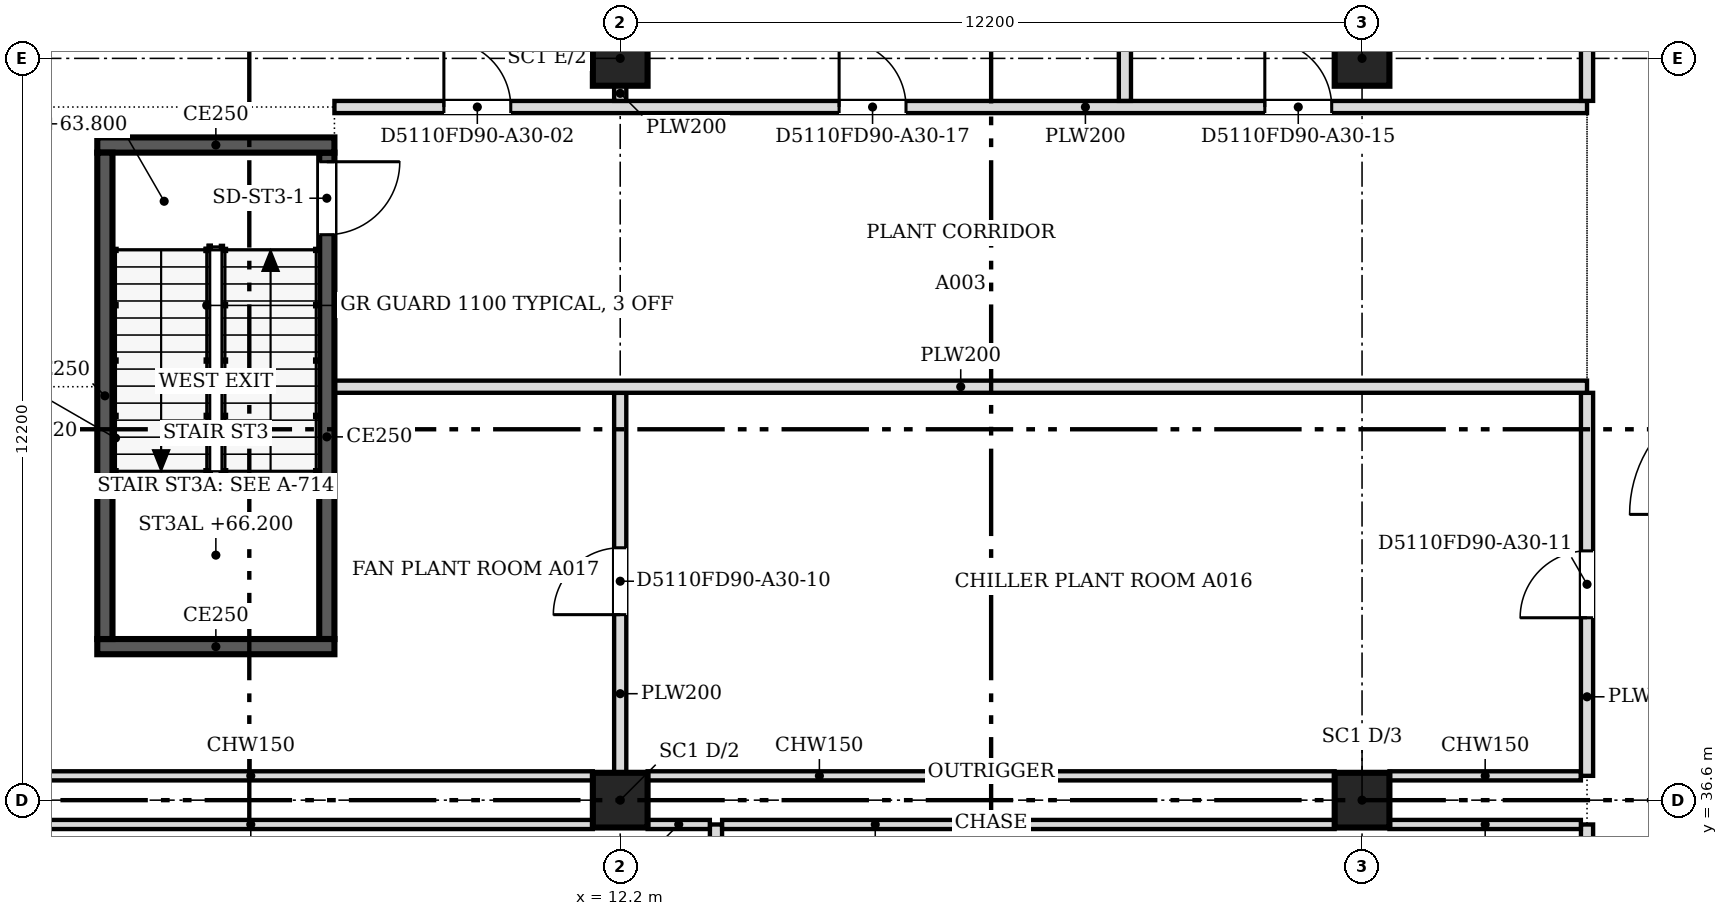
"""IFC4 building model, lengths in metres.
Left out: names, types, materials, properties, quantities, classifications, styles, units other than length and angle.
Written with IfcOpenShell. Run it as: python <this file> out.ifc"""

import sys

from ifc_helpers import new_model, si_unit, direction, frame, frame_2d, origin, origin_2d, place, context, subcontext, project, spatial, rectangle, extrude, source, transform, mapped, element, fill, save


model = new_model("IFC4")
c1 = context("Model", 3, precision=1e-05, world=origin(), true_north=direction((0.0, 1.0)))
c2 = subcontext(c1, "Body", "Model", "MODEL_VIEW")
j1 = project(units=[si_unit("LENGTHUNIT", "METRE"), si_unit("PLANEANGLEUNIT", "RADIAN")], contexts=[c1])
p1 = place(None, origin())
s1 = spatial("IfcSite", under=j1, at=p1, CompositionType="ELEMENT")
p2 = place(p1, origin())
s2 = spatial("IfcBuilding", under=s1, at=p2, CompositionType="ELEMENT")
p3 = place(p2, frame((0.0, 0.0, 63.8)))
s3 = spatial("IfcBuildingStorey", under=s2, at=p3, CompositionType="ELEMENT", Elevation=63.8)
for number, where, z_axis, x_axis in (
    (1, (12.2, 36.6, 0.0), (0.0, 0.0, 1.0), (1.0, 0.0, 0.0)),
    (2, (12.2, 48.8, 0.0), (0.0, 0.0, 1.0), (1.0, 0.0, 0.0)),
    (3, (24.4, 36.6, 0.0), (0.0, 0.0, 1.0), (1.0, 0.0, 0.0)),
    (4, (24.4, 48.8, 0.0), (0.0, 0.0, 1.0), (1.0, 0.0, 0.0)),
):
    element("IfcColumn", number, at=place(p3, frame(where, z_axis=z_axis, x_axis=x_axis)), inside=s3, PredefinedType="COLUMN", context=c2, shape_type="SweptSolid", body=[
        extrude(rectangle(XDim=0.9, YDim=0.9, at=origin_2d()), origin(), (0.0, 0.0, 1.0), 4.6),
    ])
p4 = place(p3, frame((7.5, 39.125, 0.0), z_axis=(0.0, 0.0, 1.0), x_axis=(-1.0, 0.0, 0.0)))
e5 = element("IfcWall", 5, at=p4, inside=s3, PredefinedType="SOLIDWALL", context=c2, shape_type="SweptSolid", body=[
    extrude(rectangle(XDim=3.9, YDim=0.25, at=frame_2d((1.95, 0.0))), origin(), (0.0, 0.0, 1.0), 4.8),
])
p5 = place(p3, frame((3.725, 39.25, 0.0), z_axis=(0.0, 0.0, 1.0), x_axis=(0.0, 1.0, 0.0)))
e6 = element("IfcWall", 6, at=p5, inside=s3, PredefinedType="SOLIDWALL", context=c2, shape_type="SweptSolid", body=[
    extrude(rectangle(XDim=8.0, YDim=0.25, at=frame_2d((4.0, 0.0))), origin(), (0.0, 0.0, 1.0), 4.8),
])
p6 = place(p3, frame((3.6, 47.375, 0.0), z_axis=(0.0, 0.0, 1.0), x_axis=(1.0, 0.0, 0.0)))
e7 = element("IfcWall", 7, at=p6, inside=s3, PredefinedType="SOLIDWALL", context=c2, shape_type="SweptSolid", body=[
    extrude(rectangle(XDim=3.9, YDim=0.25, at=frame_2d((1.95, 0.0))), origin(), (0.0, 0.0, 1.0), 4.8),
])
p7 = place(p3, frame((7.375, 47.25, 0.0), z_axis=(0.0, 0.0, 1.0), x_axis=(0.0, -1.0, 0.0)))
e8 = element("IfcWall", 8, at=p7, inside=s3, PredefinedType="SOLIDWALL", context=c2, shape_type="SweptSolid", body=[
    extrude(rectangle(XDim=8.0, YDim=0.25, at=frame_2d((4.0, 0.0))), origin(), (0.0, 0.0, 1.0), 4.8),
])
m1 = source(origin(), c2, "Body", "SweptSolid", [
    extrude(rectangle(XDim=1.2, YDim=2.1, at=frame_2d((0.6, 1.05))), frame((0.0, 0.135, 0.0), z_axis=(0.0, -1.0, 0.0), x_axis=(1.0, 0.0, 0.0)), (0.0, 0.0, 1.0), 0.27),
])
p8 = place(p7, frame((0.15, 0.0, 0.0)))
e9 = element("IfcOpeningElement", 9, at=p8, cuts=e8, PredefinedType="OPENING", context=c2, shape_type="MappedRepresentation", body=[
    mapped(m1, transform((0.0, 0.0, 0.0), scale=1.0)),
])
p9 = place(p3, frame((13.775, 30.201, 0.0), z_axis=(0.0, 0.0, 1.0), x_axis=(0.0, 1.0, 0.0)))
e10 = element("IfcWall", 10, at=p9, inside=s3, PredefinedType="PARTITIONING", context=c2, shape_type="SweptSolid", body=[
    extrude(rectangle(XDim=5.999, YDim=0.2, at=frame_2d((3.0, 0.0))), origin(), (0.0, 0.0, 1.0), 4.067),
])
m2 = source(origin(), c2, "Body", "SweptSolid", [
    extrude(rectangle(XDim=1.1, YDim=2.1, at=frame_2d((0.55, 1.05))), frame((0.0, 0.11, 0.0), z_axis=(0.0, -1.0, 0.0), x_axis=(1.0, 0.0, 0.0)), (0.0, 0.0, 1.0), 0.22),
])
p10 = place(p9, frame((2.4, 0.0, 0.0)))
e11 = element("IfcOpeningElement", 11, at=p10, cuts=e10, PredefinedType="OPENING", context=c2, shape_type="MappedRepresentation", body=[
    mapped(m2, transform((0.0, 0.0, 0.0), scale=1.0)),
])
p11 = place(p3, frame((28.1, 30.201, 0.0), z_axis=(0.0, 0.0, 1.0), x_axis=(0.0, 1.0, 0.0)))
e12 = element("IfcWall", 12, at=p11, inside=s3, PredefinedType="PARTITIONING", context=c2, shape_type="SweptSolid", body=[
    extrude(rectangle(XDim=5.999, YDim=0.2, at=frame_2d((3.0, 0.0))), origin(), (0.0, 0.0, 1.0), 4.067),
])
p12 = place(p11, frame((2.4, 0.0, 0.0)))
e13 = element("IfcOpeningElement", 13, at=p12, cuts=e12, PredefinedType="OPENING", context=c2, shape_type="MappedRepresentation", body=[
    mapped(m2, transform((0.0, 0.0, 0.0), scale=1.0)),
])
p13 = place(p3, frame((0.5, 36.2, 0.0), z_axis=(0.0, 0.0, 1.0), x_axis=(1.0, 0.0, 0.0)))
e14 = element("IfcWall", 14, at=p13, inside=s3, PredefinedType="PARTITIONING", context=c2, shape_type="SweptSolid", body=[
    extrude(rectangle(XDim=11.249, YDim=0.15, at=frame_2d((5.625, 0.0))), origin(), (0.0, 0.0, 1.0), 4.067),
])
p14 = place(p3, frame((12.651, 36.2, 0.0), z_axis=(0.0, 0.0, 1.0), x_axis=(1.0, 0.0, 0.0)))
e15 = element("IfcWall", 15, at=p14, inside=s3, PredefinedType="PARTITIONING", context=c2, shape_type="SweptSolid", body=[
    extrude(rectangle(XDim=1.023, YDim=0.15, at=frame_2d((0.512, 0.0))), origin(), (0.0, 0.0, 1.0), 4.067),
])
p15 = place(p3, frame((13.876, 36.2, 0.0), z_axis=(0.0, 0.0, 1.0), x_axis=(1.0, 0.0, 0.0)))
e16 = element("IfcWall", 16, at=p15, inside=s3, PredefinedType="PARTITIONING", context=c2, shape_type="SweptSolid", body=[
    extrude(rectangle(XDim=10.073, YDim=0.15, at=frame_2d((5.037, 0.0))), origin(), (0.0, 0.0, 1.0), 4.067),
])
p16 = place(p3, frame((24.851, 36.2, 0.0), z_axis=(0.0, 0.0, 1.0), x_axis=(1.0, 0.0, 0.0)))
e17 = element("IfcWall", 17, at=p16, inside=s3, PredefinedType="PARTITIONING", context=c2, shape_type="SweptSolid", body=[
    extrude(rectangle(XDim=3.148, YDim=0.15, at=frame_2d((1.574, 0.0))), origin(), (0.0, 0.0, 1.0), 4.067),
])
p17 = place(p3, frame((0.5, 37.0, 0.0), z_axis=(0.0, 0.0, 1.0), x_axis=(1.0, 0.0, 0.0)))
e18 = element("IfcWall", 18, at=p17, inside=s3, PredefinedType="PARTITIONING", context=c2, shape_type="SweptSolid", body=[
    extrude(rectangle(XDim=11.249, YDim=0.15, at=frame_2d((5.625, 0.0))), origin(), (0.0, 0.0, 1.0), 4.067),
])
p18 = place(p3, frame((12.651, 37.0, 0.0), z_axis=(0.0, 0.0, 1.0), x_axis=(1.0, 0.0, 0.0)))
e19 = element("IfcWall", 19, at=p18, inside=s3, PredefinedType="PARTITIONING", context=c2, shape_type="SweptSolid", body=[
    extrude(rectangle(XDim=11.298, YDim=0.15, at=frame_2d((5.649, 0.0))), origin(), (0.0, 0.0, 1.0), 4.067),
])
p19 = place(p3, frame((24.851, 37.0, 0.0), z_axis=(0.0, 0.0, 1.0), x_axis=(1.0, 0.0, 0.0)))
e20 = element("IfcWall", 20, at=p19, inside=s3, PredefinedType="PARTITIONING", context=c2, shape_type="SweptSolid", body=[
    extrude(rectangle(XDim=3.148, YDim=0.15, at=frame_2d((1.574, 0.0))), origin(), (0.0, 0.0, 1.0), 4.067),
])
p20 = place(p3, frame((28.1, 37.0, 0.0), z_axis=(0.0, 0.0, 1.0), x_axis=(0.0, 1.0, 0.0)))
e21 = element("IfcWall", 21, at=p20, inside=s3, PredefinedType="PARTITIONING", context=c2, shape_type="SweptSolid", body=[
    extrude(rectangle(XDim=6.299, YDim=0.2, at=frame_2d((3.149, 0.0))), origin(), (0.0, 0.0, 1.0), 4.067),
])
p21 = place(p20, frame((2.6, 0.0, 0.0)))
e22 = element("IfcOpeningElement", 22, at=p21, cuts=e21, PredefinedType="OPENING", context=c2, shape_type="MappedRepresentation", body=[
    mapped(m2, transform((0.0, 0.0, 0.0), scale=1.0)),
])
p22 = place(p3, frame((12.2, 37.051, 0.0), z_axis=(0.0, 0.0, 1.0), x_axis=(0.0, 1.0, 0.0)))
e23 = element("IfcWall", 23, at=p22, inside=s3, PredefinedType="PARTITIONING", context=c2, shape_type="SweptSolid", body=[
    extrude(rectangle(XDim=6.248, YDim=0.2, at=frame_2d((3.124, 0.0))), origin(), (0.0, 0.0, 1.0), 4.067),
])
p23 = place(p22, frame((2.6, 0.0, 0.0)))
e24 = element("IfcOpeningElement", 24, at=p23, cuts=e23, PredefinedType="OPENING", context=c2, shape_type="MappedRepresentation", body=[
    mapped(m2, transform((0.0, 0.0, 0.0), scale=1.0)),
])
p24 = place(p3, frame((7.5, 43.4, 0.0), z_axis=(0.0, 0.0, 1.0), x_axis=(1.0, 0.0, 0.0)))
e25 = element("IfcWall", 25, at=p24, inside=s3, PredefinedType="PARTITIONING", context=c2, shape_type="SweptSolid", body=[
    extrude(rectangle(XDim=20.6, YDim=0.2, at=frame_2d((10.3, 0.0))), origin(), (0.0, 0.0, 1.0), 4.067),
])
p25 = place(p3, frame((7.5, 48.0, 0.0), z_axis=(0.0, 0.0, 1.0), x_axis=(1.0, 0.0, 0.0)))
e26 = element("IfcWall", 26, at=p25, inside=s3, PredefinedType="PARTITIONING", context=c2, shape_type="SweptSolid", body=[
    extrude(rectangle(XDim=20.6, YDim=0.2, at=frame_2d((10.3, 0.0))), origin(), (0.0, 0.0, 1.0), 4.067),
])
p26 = place(p25, frame((1.8, 0.0, 0.0)))
e27 = element("IfcOpeningElement", 27, at=p26, cuts=e26, PredefinedType="OPENING", context=c2, shape_type="MappedRepresentation", body=[
    mapped(m2, transform((0.0, 0.0, 0.0), scale=1.0)),
])
p27 = place(p25, frame((15.301, 0.0, 0.0)))
e28 = element("IfcOpeningElement", 28, at=p27, cuts=e26, PredefinedType="OPENING", context=c2, shape_type="MappedRepresentation", body=[
    mapped(m2, transform((0.0, 0.0, 0.0), scale=1.0)),
])
p28 = place(p25, frame((8.3, 0.0, 0.0)))
e29 = element("IfcOpeningElement", 29, at=p28, cuts=e26, PredefinedType="OPENING", context=c2, shape_type="MappedRepresentation", body=[
    mapped(m2, transform((0.0, 0.0, 0.0), scale=1.0)),
])
p29 = place(p3, frame((12.2, 48.101, 0.0), z_axis=(0.0, 0.0, 1.0), x_axis=(0.0, 1.0, 0.0)))
e30 = element("IfcWall", 30, at=p29, inside=s3, PredefinedType="PARTITIONING", context=c2, shape_type="SweptSolid", body=[
    extrude(rectangle(XDim=0.248, YDim=0.2, at=frame_2d((0.124, 0.0))), origin(), (0.0, 0.0, 1.0), 4.067),
])
p30 = place(p3, frame((20.5, 48.101, 0.0), z_axis=(0.0, 0.0, 1.0), x_axis=(0.0, 1.0, 0.0)))
e31 = element("IfcWall", 31, at=p30, inside=s3, PredefinedType="PARTITIONING", context=c2, shape_type="SweptSolid", body=[
    extrude(rectangle(XDim=6.299, YDim=0.2, at=frame_2d((3.149, 0.0))), origin(), (0.0, 0.0, 1.0), 4.067),
])
p31 = place(p3, frame((28.1, 48.101, 0.0), z_axis=(0.0, 0.0, 1.0), x_axis=(0.0, 1.0, 0.0)))
e32 = element("IfcWall", 32, at=p31, inside=s3, PredefinedType="PARTITIONING", context=c2, shape_type="SweptSolid", body=[
    extrude(rectangle(XDim=2.998, YDim=0.2, at=frame_2d((1.499, 0.0))), origin(), (0.0, 0.0, 1.0), 4.067),
])
m3 = source(origin(), c2, "Body", "SweptSolid", [
    extrude(rectangle(XDim=1.2, YDim=2.1, at=frame_2d((0.6, 1.05))), frame((0.0, 0.025, 0.0), z_axis=(0.0, -1.0, 0.0), x_axis=(1.0, 0.0, 0.0)), (0.0, 0.0, 1.0), 0.05),
])
p32 = place(p8, origin())
e33 = element("IfcDoor", 33, at=p32, inside=s3, OperationType="SINGLE_SWING_LEFT", PredefinedType="DOOR", context=c2, shape_type="MappedRepresentation", body=[
    mapped(m3, transform((0.0, 0.0, 0.0), scale=1.0)),
])
fill(e9, e33)
m4 = source(origin(), c2, "Body", "SweptSolid", [
    extrude(rectangle(XDim=1.1, YDim=2.1, at=frame_2d((0.55, 1.05))), frame((0.0, 0.025, 0.0), z_axis=(0.0, -1.0, 0.0), x_axis=(1.0, 0.0, 0.0)), (0.0, 0.0, 1.0), 0.05),
])
p33 = place(p26, origin())
e34 = element("IfcDoor", 34, at=p33, inside=s3, OperationType="SINGLE_SWING_LEFT", PredefinedType="DOOR", context=c2, shape_type="MappedRepresentation", body=[
    mapped(m4, transform((0.0, 0.0, 0.0), scale=1.0)),
])
fill(e27, e34)
p34 = place(p23, origin())
e35 = element("IfcDoor", 35, at=p34, inside=s3, OperationType="SINGLE_SWING_LEFT", PredefinedType="DOOR", context=c2, shape_type="MappedRepresentation", body=[
    mapped(m4, transform((0.0, 0.0, 0.0), scale=1.0)),
])
fill(e24, e35)
p35 = place(p21, origin())
e36 = element("IfcDoor", 36, at=p35, inside=s3, OperationType="SINGLE_SWING_LEFT", PredefinedType="DOOR", context=c2, shape_type="MappedRepresentation", body=[
    mapped(m4, transform((0.0, 0.0, 0.0), scale=1.0)),
])
fill(e22, e36)
p36 = place(p27, origin())
e37 = element("IfcDoor", 37, at=p36, inside=s3, OperationType="SINGLE_SWING_LEFT", PredefinedType="DOOR", context=c2, shape_type="MappedRepresentation", body=[
    mapped(m4, transform((0.0, 0.0, 0.0), scale=1.0)),
])
fill(e28, e37)
p37 = place(p28, origin())
e38 = element("IfcDoor", 38, at=p37, inside=s3, OperationType="SINGLE_SWING_LEFT", PredefinedType="DOOR", context=c2, shape_type="MappedRepresentation", body=[
    mapped(m4, transform((0.0, 0.0, 0.0), scale=1.0)),
])
fill(e29, e38)
save(model, sys.argv[1])
